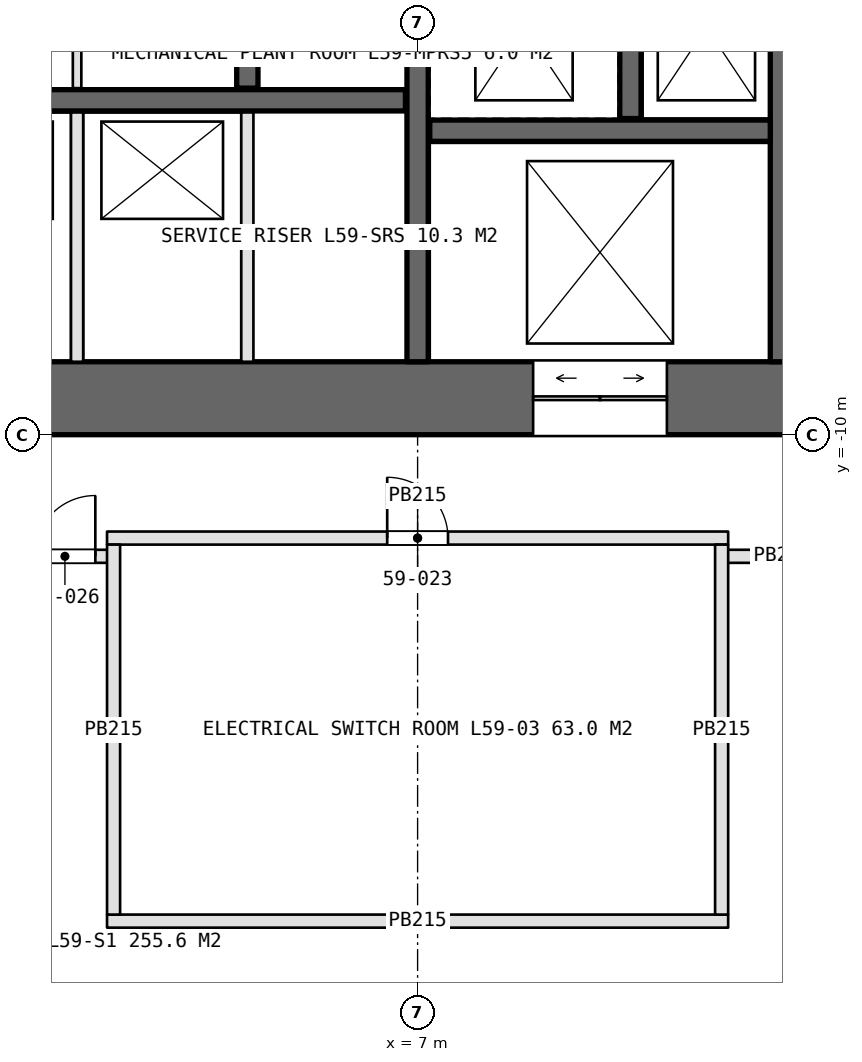
"""IFC4 building model, lengths in metres.
Left out: names, types, materials, properties, quantities, classifications, styles, units other than length and angle.
Written with IfcOpenShell. Run it as: python <this file> out.ifc"""

import sys

from ifc_helpers import new_model, si_unit, direction, frame, frame_2d, origin, place, context, subcontext, project, spatial, rectangle, extrude, element, fill, save


model = new_model("IFC4")
c1 = context("Model", 3, precision=1e-05, world=origin(), true_north=direction((0.0, 1.0)))
c2 = subcontext(c1, "Body", "Model", "MODEL_VIEW")
j1 = project(units=[si_unit("LENGTHUNIT", "METRE"), si_unit("PLANEANGLEUNIT", "RADIAN")], contexts=[c1])
p1 = place(None, origin())
s1 = spatial("IfcSite", under=j1, at=p1, CompositionType="ELEMENT")
p2 = place(p1, origin())
s2 = spatial("IfcBuilding", under=s1, at=p2, CompositionType="ELEMENT")
p3 = place(p2, frame((0.0, 0.0, 266.2)))
s3 = spatial("IfcBuildingStorey", under=s2, at=p3, CompositionType="ELEMENT", Elevation=266.2)
p4 = place(p3, frame((-14.0, -9.4, 0.0), z_axis=(0.0, 0.0, 1.0), x_axis=(1.0, 0.0, 0.0)))
e1 = element("IfcWall", 1, at=p4, inside=s3, PredefinedType="SHEAR", context=c2, shape_type="SweptSolid", body=[
    extrude(rectangle(XDim=28.0, YDim=1.2, at=frame_2d((14.0, 0.0))), origin(), (0.0, 0.0, 1.0), 5.0),
])
p5 = place(p4, frame((22.9, 0.0, 0.0)))
e2 = element("IfcOpeningElement", 2, at=p5, cuts=e1, PredefinedType="OPENING", context=c2, shape_type="SweptSolid", body=[
    extrude(rectangle(XDim=2.2, YDim=2.7, at=frame_2d((1.1, 1.35))), frame((0.0, 0.61, 0.0), z_axis=(0.0, -1.0, 0.0), x_axis=(1.0, 0.0, 0.0)), (0.0, 0.0, 1.0), 1.22),
])
p6 = place(p3, frame((13.4, -8.8, 0.0), z_axis=(0.0, 0.0, 1.0), x_axis=(0.0, 1.0, 0.0)))
e3 = element("IfcWall", 3, at=p6, inside=s3, PredefinedType="SHEAR", context=c2, shape_type="SweptSolid", body=[
    extrude(rectangle(XDim=17.6, YDim=1.2, at=frame_2d((8.8, 0.0))), origin(), (0.0, 0.0, 1.0), 5.0),
])
p7 = place(p6, frame((7.9, 0.0, 0.0)))
e4 = element("IfcOpeningElement", 4, at=p7, cuts=e3, PredefinedType="OPENING", context=c2, shape_type="SweptSolid", body=[
    extrude(rectangle(XDim=1.8, YDim=2.4, at=frame_2d((0.9, 1.2))), frame((0.0, 0.61, 0.0), z_axis=(0.0, -1.0, 0.0), x_axis=(1.0, 0.0, 0.0)), (0.0, 0.0, 1.0), 1.22),
])
p8 = place(p3, frame((7.0, -8.8, 0.0), z_axis=(0.0, 0.0, 1.0), x_axis=(0.0, 1.0, 0.0)))
e5 = element("IfcWall", 5, at=p8, inside=s3, PredefinedType="SHEAR", context=c2, shape_type="SweptSolid", body=[
    extrude(rectangle(XDim=17.6, YDim=0.35, at=frame_2d((8.8, 0.0))), origin(), (0.0, 0.0, 1.0), 5.0),
])
p9 = place(p8, frame((7.9, 0.0, 0.0)))
e6 = element("IfcOpeningElement", 6, at=p9, cuts=e5, PredefinedType="OPENING", context=c2, shape_type="SweptSolid", body=[
    extrude(rectangle(XDim=1.8, YDim=2.4, at=frame_2d((0.9, 1.2))), frame((0.0, 0.185, 0.0), z_axis=(0.0, -1.0, 0.0), x_axis=(1.0, 0.0, 0.0)), (0.0, 0.0, 1.0), 0.37),
])
p10 = place(p3, frame((-6.8, -4.5, 0.0), z_axis=(0.0, 0.0, 1.0), x_axis=(1.0, 0.0, 0.0)))
e7 = element("IfcWall", 7, at=p10, inside=s3, PredefinedType="SHEAR", context=c2, shape_type="SweptSolid", body=[
    extrude(rectangle(XDim=13.6, YDim=0.35, at=frame_2d((6.8, 0.0))), origin(), (0.0, 0.0, 1.0), 5.0),
])
p11 = place(p3, frame((10.5, -4.8, 0.0), z_axis=(0.0, 0.0, 1.0), x_axis=(0.0, 1.0, 0.0)))
e8 = element("IfcWall", 8, at=p11, inside=s3, PredefinedType="SHEAR", context=c2, shape_type="SweptSolid", body=[
    extrude(rectangle(XDim=3.0, YDim=0.35, at=frame_2d((1.5, 0.0))), origin(), (0.0, 0.0, 1.0), 5.0),
])
p12 = place(p3, frame((7.2, -5.0, 0.0), z_axis=(0.0, 0.0, 1.0), x_axis=(1.0, 0.0, 0.0)))
e9 = element("IfcWall", 9, at=p12, inside=s3, PredefinedType="SHEAR", context=c2, shape_type="SweptSolid", body=[
    extrude(rectangle(XDim=5.6, YDim=0.35, at=frame_2d((2.8, 0.0))), origin(), (0.0, 0.0, 1.0), 5.0),
])
p13 = place(p3, frame((4.2, -4.3, 0.0), z_axis=(0.0, 0.0, 1.0), x_axis=(0.0, 1.0, 0.0)))
e10 = element("IfcWall", 10, at=p13, inside=s3, PredefinedType="SHEAR", context=c2, shape_type="SweptSolid", body=[
    extrude(rectangle(XDim=2.5, YDim=0.35, at=frame_2d((1.25, 0.0))), origin(), (0.0, 0.0, 1.0), 5.0),
])
p14 = place(p3, frame((1.4, -1.8, 0.0), z_axis=(0.0, 0.0, 1.0), x_axis=(0.0, -1.0, 0.0)))
e11 = element("IfcWall", 11, at=p14, inside=s3, PredefinedType="PARTITIONING", context=c2, shape_type="SweptSolid", body=[
    extrude(rectangle(XDim=2.5, YDim=0.14, at=frame_2d((1.25, 0.0))), origin(), (0.0, 0.0, 1.0), 4.75),
])
for number, where, z_axis, x_axis in (
    (12, (1.4, -4.7, 0.0), (0.0, 0.0, 1.0), (0.0, -1.0, 0.0)),
    (13, (4.2, -4.7, 0.0), (0.0, 0.0, 1.0), (0.0, -1.0, 0.0)),
):
    element("IfcWall", number, at=place(p3, frame(where, z_axis=z_axis, x_axis=x_axis)), inside=s3, PredefinedType="PARTITIONING", context=c2, shape_type="SweptSolid", body=[
        extrude(rectangle(XDim=4.1, YDim=0.2, at=frame_2d((2.05, 0.0))), origin(), (0.0, 0.0, 1.0), 5.0),
    ])
p15 = place(p3, frame((-1.0, -12.0, 0.0), z_axis=(0.0, 0.0, 1.0), x_axis=(1.0, 0.0, 0.0)))
e14 = element("IfcWall", 14, at=p15, inside=s3, PredefinedType="PARTITIONING", context=c2, shape_type="SweptSolid", body=[
    extrude(rectangle(XDim=3.0, YDim=0.215, at=frame_2d((1.5, 0.0))), origin(), (0.0, 0.0, 1.0), 4.2),
])
p16 = place(p15, frame((1.7, 0.0, 0.0)))
e15 = element("IfcOpeningElement", 15, at=p16, cuts=e14, PredefinedType="OPENING", context=c2, shape_type="SweptSolid", body=[
    extrude(rectangle(XDim=1.0, YDim=2.2, at=frame_2d((0.5, 1.1))), frame((0.0, 0.118, 0.0), z_axis=(0.0, -1.0, 0.0), x_axis=(1.0, 0.0, 0.0)), (0.0, 0.0, 1.0), 0.235),
])
p17 = place(p3, frame((12.0, -12.0, 0.0), z_axis=(0.0, 0.0, 1.0), x_axis=(1.0, 0.0, 0.0)))
e16 = element("IfcWall", 16, at=p17, inside=s3, PredefinedType="PARTITIONING", context=c2, shape_type="SweptSolid", body=[
    extrude(rectangle(XDim=2.0, YDim=0.215, at=frame_2d((1.0, 0.0))), origin(), (0.0, 0.0, 1.0), 4.2),
])
p18 = place(p3, frame((1.893, -18.0, 0.0), z_axis=(0.0, 0.0, 1.0), x_axis=(1.0, 0.0, 0.0)))
e17 = element("IfcWall", 17, at=p18, inside=s3, PredefinedType="PARTITIONING", context=c2, shape_type="SweptSolid", body=[
    extrude(rectangle(XDim=10.215, YDim=0.215, at=frame_2d((5.107, 0.0))), origin(), (0.0, 0.0, 1.0), 4.2),
])
p19 = place(p3, frame((1.893, -11.7, 0.0), z_axis=(0.0, 0.0, 1.0), x_axis=(1.0, 0.0, 0.0)))
e18 = element("IfcWall", 18, at=p19, inside=s3, PredefinedType="PARTITIONING", context=c2, shape_type="SweptSolid", body=[
    extrude(rectangle(XDim=10.215, YDim=0.215, at=frame_2d((5.107, 0.0))), origin(), (0.0, 0.0, 1.0), 4.2),
])
p20 = place(p19, frame((4.607, 0.0, 0.0)))
e19 = element("IfcOpeningElement", 19, at=p20, cuts=e18, PredefinedType="OPENING", context=c2, shape_type="SweptSolid", body=[
    extrude(rectangle(XDim=1.0, YDim=2.2, at=frame_2d((0.5, 1.1))), frame((0.0, 0.118, 0.0), z_axis=(0.0, -1.0, 0.0), x_axis=(1.0, 0.0, 0.0)), (0.0, 0.0, 1.0), 0.235),
])
for number, where, z_axis, x_axis in (
    (20, (2.0, -17.893, 0.0), (0.0, 0.0, 1.0), (0.0, 1.0, 0.0)),
    (21, (12.0, -17.893, 0.0), (0.0, 0.0, 1.0), (0.0, 1.0, 0.0)),
):
    element("IfcWall", number, at=place(p3, frame(where, z_axis=z_axis, x_axis=x_axis)), inside=s3, PredefinedType="PARTITIONING", context=c2, shape_type="SweptSolid", body=[
        extrude(rectangle(XDim=6.085, YDim=0.215, at=frame_2d((3.042, 0.0))), origin(), (0.0, 0.0, 1.0), 4.2),
    ])
p21 = place(p5, origin())
e22 = element("IfcDoor", 22, at=p21, inside=s3, OperationType="DOUBLE_DOOR_SLIDING", PredefinedType="DOOR", context=c2, shape_type="SweptSolid", body=[
    extrude(rectangle(XDim=2.2, YDim=2.7, at=frame_2d((1.1, 1.35))), frame((0.0, 0.025, 0.0), z_axis=(0.0, -1.0, 0.0), x_axis=(1.0, 0.0, 0.0)), (0.0, 0.0, 1.0), 0.05),
])
fill(e2, e22)
p22 = place(p20, origin())
e23 = element("IfcDoor", 23, at=p22, inside=s3, OperationType="SINGLE_SWING_LEFT", PredefinedType="DOOR", context=c2, shape_type="SweptSolid", body=[
    extrude(rectangle(XDim=1.0, YDim=2.2, at=frame_2d((0.5, 1.1))), frame((0.0, 0.025, 0.0), z_axis=(0.0, -1.0, 0.0), x_axis=(1.0, 0.0, 0.0)), (0.0, 0.0, 1.0), 0.05),
])
fill(e19, e23)
p23 = place(p16, origin())
e24 = element("IfcDoor", 24, at=p23, inside=s3, OperationType="SINGLE_SWING_RIGHT", PredefinedType="DOOR", context=c2, shape_type="SweptSolid", body=[
    extrude(rectangle(XDim=1.0, YDim=2.2, at=frame_2d((0.5, 1.1))), frame((0.0, 0.025, 0.0), z_axis=(0.0, -1.0, 0.0), x_axis=(1.0, 0.0, 0.0)), (0.0, 0.0, 1.0), 0.05),
])
fill(e15, e24)
save(model, sys.argv[1])
